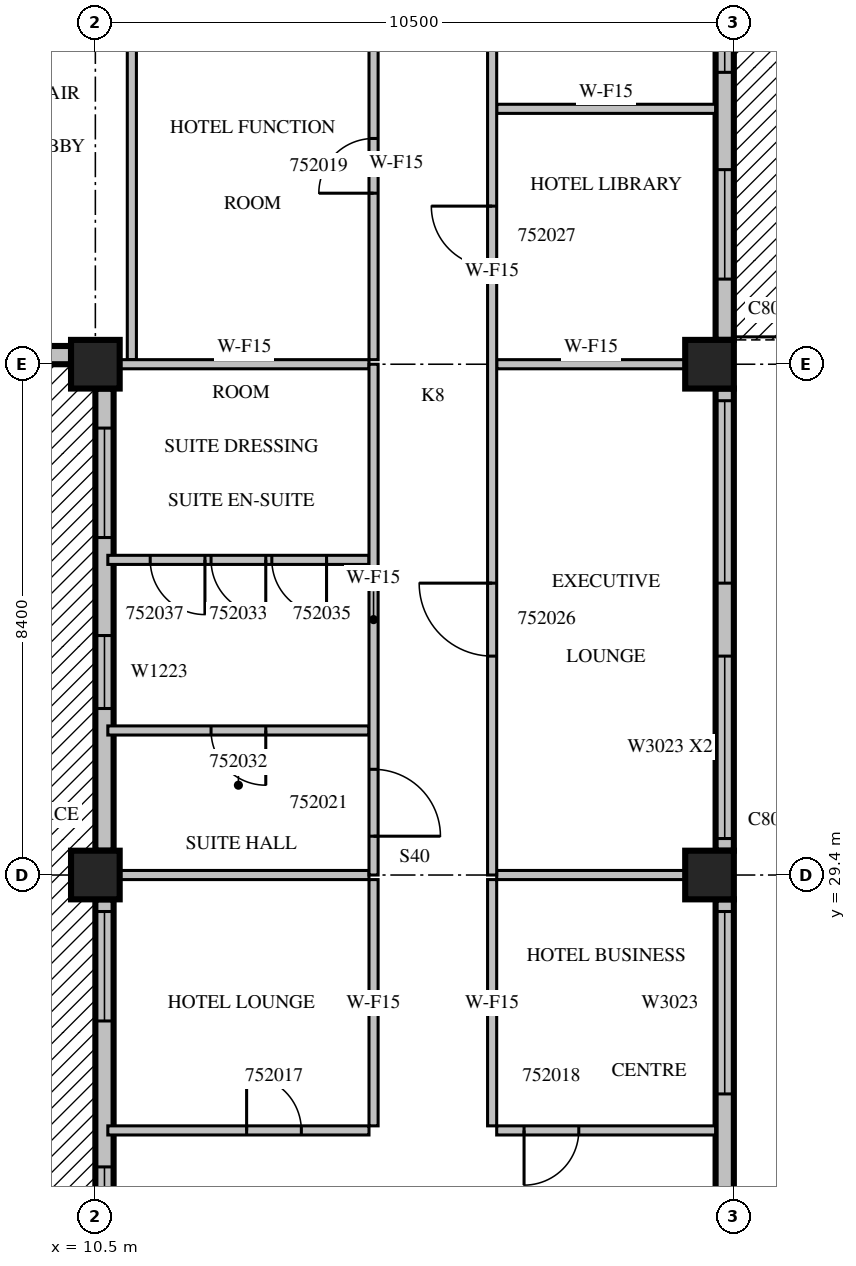
"""IFC4 building model, lengths in metres.
Left out: names, types, materials, properties, quantities, classifications, styles, units other than length and angle.
Written with IfcOpenShell. Run it as: python <this file> out.ifc"""

import sys

from ifc_helpers import new_model, si_unit, direction, frame, frame_2d, origin, origin_2d, place, context, subcontext, project, spatial, rectangle, extrude, source, transform, mapped, element, fill, save


model = new_model("IFC4")
c1 = context("Model", 3, precision=1e-05, world=origin(), true_north=direction((0.0, 1.0)))
c2 = subcontext(c1, "Body", "Model", "MODEL_VIEW")
j1 = project(units=[si_unit("LENGTHUNIT", "METRE"), si_unit("PLANEANGLEUNIT", "RADIAN")], contexts=[c1])
p1 = place(None, origin())
s1 = spatial("IfcSite", under=j1, at=p1, CompositionType="ELEMENT")
p2 = place(p1, origin())
s2 = spatial("IfcBuilding", under=s1, at=p2, CompositionType="ELEMENT")
p3 = place(p2, frame((0.0, 0.0, 231.0)))
s3 = spatial("IfcBuildingStorey", under=s2, at=p3, CompositionType="ELEMENT", Elevation=231.0)
m1 = source(origin(), c2, "Body", "SweptSolid", [
    extrude(rectangle(XDim=0.8, YDim=0.8, at=origin_2d()), origin(), (0.0, 0.0, 1.0), 3.8),
])
for number, where, z_axis, x_axis in (
    (1, (10.5, 29.4, 0.0), (0.0, 0.0, 1.0), (1.0, 0.0, 0.0)),
    (2, (20.6, 29.4, 0.0), (0.0, 0.0, 1.0), (1.0, 0.0, 0.0)),
    (3, (10.5, 37.8, 0.0), (0.0, 0.0, 1.0), (1.0, 0.0, 0.0)),
    (4, (20.6, 37.8, 0.0), (0.0, 0.0, 1.0), (1.0, 0.0, 0.0)),
):
    element("IfcColumn", number, at=place(p3, frame(where, z_axis=z_axis, x_axis=x_axis)), inside=s3, PredefinedType="COLUMN", context=c2, shape_type="MappedRepresentation", body=[
        mapped(m1, transform((0.0, 0.0, 0.0), scale=1.0)),
    ])
m2 = source(origin(), c2, "Body", "SweptSolid", [
    extrude(rectangle(XDim=7.2, YDim=0.3, at=frame_2d((3.6, 0.0))), origin(), (0.0, 0.0, 1.0), 3.4),
])
p4 = place(p3, frame((20.85, 21.8, 0.0), z_axis=(0.0, 0.0, 1.0), x_axis=(0.0, 1.0, 0.0)))
e5 = element("IfcWall", 5, at=p4, inside=s3, PredefinedType="STANDARD", context=c2, shape_type="MappedRepresentation", body=[
    mapped(m2, transform((0.0, 0.0, 0.0), scale=1.0)),
])
m3 = source(origin(), c2, "Body", "SweptSolid", [
    extrude(rectangle(XDim=1.8, YDim=2.3, at=frame_2d((0.9, 1.15))), frame((0.0, 0.16, 0.0), z_axis=(0.0, -1.0, 0.0), x_axis=(1.0, 0.0, 0.0)), (0.0, 0.0, 1.0), 0.32),
])
p5 = place(p4, frame((0.4, 0.0, 0.6)))
e6 = element("IfcOpeningElement", 6, at=p5, cuts=e5, PredefinedType="OPENING", context=c2, shape_type="MappedRepresentation", body=[
    mapped(m3, transform((0.0, 0.0, 0.0), scale=1.0)),
])
m4 = source(origin(), c2, "Body", "SweptSolid", [
    extrude(rectangle(XDim=3.0, YDim=2.3, at=frame_2d((1.5, 1.15))), frame((0.0, 0.16, 0.0), z_axis=(0.0, -1.0, 0.0), x_axis=(1.0, 0.0, 0.0)), (0.0, 0.0, 1.0), 0.32),
])
p6 = place(p4, frame((4.0, 0.0, 0.6)))
e7 = element("IfcOpeningElement", 7, at=p6, cuts=e5, PredefinedType="OPENING", context=c2, shape_type="MappedRepresentation", body=[
    mapped(m4, transform((0.0, 0.0, 0.0), scale=1.0)),
])
m5 = source(origin(), c2, "Body", "SweptSolid", [
    extrude(rectangle(XDim=7.6, YDim=0.3, at=frame_2d((3.8, 0.0))), origin(), (0.0, 0.0, 1.0), 3.4),
])
p7 = place(p3, frame((20.85, 29.8, 0.0), z_axis=(0.0, 0.0, 1.0), x_axis=(0.0, 1.0, 0.0)))
e8 = element("IfcWall", 8, at=p7, inside=s3, PredefinedType="STANDARD", context=c2, shape_type="MappedRepresentation", body=[
    mapped(m5, transform((0.0, 0.0, 0.0), scale=1.0)),
])
p8 = place(p7, frame((0.2, 0.0, 0.6)))
e9 = element("IfcOpeningElement", 9, at=p8, cuts=e8, PredefinedType="OPENING", context=c2, shape_type="MappedRepresentation", body=[
    mapped(m4, transform((0.0, 0.0, 0.0), scale=1.0)),
])
p9 = place(p7, frame((4.4, 0.0, 0.6)))
e10 = element("IfcOpeningElement", 10, at=p9, cuts=e8, PredefinedType="OPENING", context=c2, shape_type="MappedRepresentation", body=[
    mapped(m4, transform((0.0, 0.0, 0.0), scale=1.0)),
])
p10 = place(p3, frame((20.85, 38.2, 0.0), z_axis=(0.0, 0.0, 1.0), x_axis=(0.0, 1.0, 0.0)))
e11 = element("IfcWall", 11, at=p10, inside=s3, PredefinedType="STANDARD", context=c2, shape_type="MappedRepresentation", body=[
    mapped(m5, transform((0.0, 0.0, 0.0), scale=1.0)),
])
m6 = source(origin(), c2, "Body", "SweptSolid", [
    extrude(rectangle(XDim=1.8, YDim=2.4, at=frame_2d((0.9, 1.2))), frame((0.0, 0.16, 0.0), z_axis=(0.0, -1.0, 0.0), x_axis=(1.0, 0.0, 0.0)), (0.0, 0.0, 1.0), 0.32),
])
p11 = place(p10, frame((1.0, 0.0, 0.0)))
e12 = element("IfcOpeningElement", 12, at=p11, cuts=e11, PredefinedType="OPENING", context=c2, shape_type="MappedRepresentation", body=[
    mapped(m6, transform((0.0, 0.0, 0.0), scale=1.0)),
])
p12 = place(p10, frame((4.4, 0.0, 0.6)))
e13 = element("IfcOpeningElement", 13, at=p12, cuts=e11, PredefinedType="OPENING", context=c2, shape_type="MappedRepresentation", body=[
    mapped(m4, transform((0.0, 0.0, 0.0), scale=1.0)),
])
p13 = place(p3, frame((8.7, 37.95, 0.0), z_axis=(0.0, 0.0, 1.0), x_axis=(1.0, 0.0, 0.0)))
e14 = element("IfcWall", 14, at=p13, inside=s3, PredefinedType="STANDARD", context=c2, shape_type="SweptSolid", body=[
    extrude(rectangle(XDim=1.4, YDim=0.3, at=frame_2d((0.7, 0.0))), origin(), (0.0, 0.0, 1.0), 3.4),
])
p14 = place(p3, frame((10.65, 37.4, 0.0), z_axis=(0.0, 0.0, 1.0), x_axis=(0.0, -1.0, 0.0)))
e15 = element("IfcWall", 15, at=p14, inside=s3, PredefinedType="STANDARD", context=c2, shape_type="MappedRepresentation", body=[
    mapped(m5, transform((0.0, 0.0, 0.0), scale=1.0)),
])
p15 = place(p14, frame((0.65, 0.0, 0.0)))
e16 = element("IfcOpeningElement", 16, at=p15, cuts=e15, PredefinedType="OPENING", context=c2, shape_type="MappedRepresentation", body=[
    mapped(m6, transform((0.0, 0.0, 0.0), scale=1.0)),
])
m7 = source(origin(), c2, "Body", "SweptSolid", [
    extrude(rectangle(XDim=1.2, YDim=2.3, at=frame_2d((0.6, 1.15))), frame((0.0, 0.16, 0.0), z_axis=(0.0, -1.0, 0.0), x_axis=(1.0, 0.0, 0.0)), (0.0, 0.0, 1.0), 0.32),
])
p16 = place(p14, frame((4.061, 0.0, 0.6)))
e17 = element("IfcOpeningElement", 17, at=p16, cuts=e15, PredefinedType="OPENING", context=c2, shape_type="MappedRepresentation", body=[
    mapped(m7, transform((0.0, 0.0, 0.0), scale=1.0)),
])
p17 = place(p3, frame((10.65, 29.0, 0.0), z_axis=(0.0, 0.0, 1.0), x_axis=(0.0, -1.0, 0.0)))
e18 = element("IfcWall", 18, at=p17, inside=s3, PredefinedType="STANDARD", context=c2, shape_type="MappedRepresentation", body=[
    mapped(m2, transform((0.0, 0.0, 0.0), scale=1.0)),
])
p18 = place(p17, frame((0.2, 0.0, 0.0)))
e19 = element("IfcOpeningElement", 19, at=p18, cuts=e18, PredefinedType="OPENING", context=c2, shape_type="MappedRepresentation", body=[
    mapped(m6, transform((0.0, 0.0, 0.0), scale=1.0)),
])
p19 = place(p17, frame((4.4, 0.0, 0.0)))
e20 = element("IfcOpeningElement", 20, at=p19, cuts=e18, PredefinedType="OPENING", context=c2, shape_type="MappedRepresentation", body=[
    mapped(m6, transform((0.0, 0.0, 0.0), scale=1.0)),
])
m8 = source(origin(), c2, "Body", "SweptSolid", [
    extrude(rectangle(XDim=4.295, YDim=0.15, at=frame_2d((2.147, 0.0))), origin(), (0.0, 0.0, 1.0), 3.4),
])
p20 = place(p3, frame((10.705, 25.2, 0.0), z_axis=(0.0, 0.0, 1.0), x_axis=(1.0, 0.0, 0.0)))
e21 = element("IfcWall", 21, at=p20, inside=s3, PredefinedType="PARTITIONING", context=c2, shape_type="MappedRepresentation", body=[
    mapped(m8, transform((0.0, 0.0, 0.0), scale=1.0)),
])
m9 = source(origin(), c2, "Body", "SweptSolid", [
    extrude(rectangle(XDim=0.9, YDim=2.1, at=frame_2d((0.45, 1.05))), frame((0.0, 0.085, 0.0), z_axis=(0.0, -1.0, 0.0), x_axis=(1.0, 0.0, 0.0)), (0.0, 0.0, 1.0), 0.17),
])
p21 = place(p20, frame((2.283, 0.0, 0.0)))
e22 = element("IfcOpeningElement", 22, at=p21, cuts=e21, PredefinedType="OPENING", context=c2, shape_type="MappedRepresentation", body=[
    mapped(m9, transform((0.0, 0.0, 0.0), scale=1.0)),
])
m10 = source(origin(), c2, "Body", "SweptSolid", [
    extrude(rectangle(XDim=3.6, YDim=0.15, at=frame_2d((1.8, 0.0))), origin(), (0.0, 0.0, 1.0), 3.4),
])
p22 = place(p3, frame((17.1, 25.2, 0.0), z_axis=(0.0, 0.0, 1.0), x_axis=(1.0, 0.0, 0.0)))
e23 = element("IfcWall", 23, at=p22, inside=s3, PredefinedType="PARTITIONING", context=c2, shape_type="MappedRepresentation", body=[
    mapped(m10, transform((0.0, 0.0, 0.0), scale=1.0)),
])
p23 = place(p22, frame((0.45, 0.0, 0.0)))
e24 = element("IfcOpeningElement", 24, at=p23, cuts=e23, PredefinedType="OPENING", context=c2, shape_type="MappedRepresentation", body=[
    mapped(m9, transform((0.0, 0.0, 0.0), scale=1.0)),
])
m11 = source(origin(), c2, "Body", "SweptSolid", [
    extrude(rectangle(XDim=4.05, YDim=0.15, at=frame_2d((2.025, 0.0))), origin(), (0.0, 0.0, 1.0), 3.4),
])
for number, where, z_axis, x_axis in (
    (25, (15.075, 25.275, 0.0), (0.0, 0.0, 1.0), (0.0, 1.0, 0.0)),
    (26, (17.025, 29.325, 0.0), (0.0, 0.0, 1.0), (0.0, -1.0, 0.0)),
):
    element("IfcWall", number, at=place(p3, frame(where, z_axis=z_axis, x_axis=x_axis)), inside=s3, PredefinedType="PARTITIONING", context=c2, shape_type="MappedRepresentation", body=[
        mapped(m11, transform((0.0, 0.0, 0.0), scale=1.0)),
    ])
m12 = source(origin(), c2, "Body", "SweptSolid", [
    extrude(rectangle(XDim=4.101, YDim=0.15, at=frame_2d((2.05, 0.0))), origin(), (0.0, 0.0, 1.0), 3.4),
])
p24 = place(p3, frame((15.0, 29.4, 0.0), z_axis=(0.0, 0.0, 1.0), x_axis=(-1.0, 0.0, 0.0)))
e27 = element("IfcWall", 27, at=p24, inside=s3, PredefinedType="PARTITIONING", context=c2, shape_type="MappedRepresentation", body=[
    mapped(m12, transform((0.0, 0.0, 0.0), scale=1.0)),
])
m13 = source(origin(), c2, "Body", "SweptSolid", [
    extrude(rectangle(XDim=3.101, YDim=0.15, at=frame_2d((1.55, 0.0))), origin(), (0.0, 0.0, 1.0), 3.4),
])
p25 = place(p3, frame((20.201, 29.4, 0.0), z_axis=(0.0, 0.0, 1.0), x_axis=(-1.0, 0.0, 0.0)))
e28 = element("IfcWall", 28, at=p25, inside=s3, PredefinedType="PARTITIONING", context=c2, shape_type="MappedRepresentation", body=[
    mapped(m13, transform((0.0, 0.0, 0.0), scale=1.0)),
])
m14 = source(origin(), c2, "Body", "SweptSolid", [
    extrude(rectangle(XDim=6.45, YDim=0.15, at=frame_2d((3.225, 0.0))), origin(), (0.0, 0.0, 1.0), 3.4),
])
p26 = place(p3, frame((11.1, 44.325, 0.0), z_axis=(0.0, 0.0, 1.0), x_axis=(0.0, -1.0, 0.0)))
e29 = element("IfcWall", 29, at=p26, inside=s3, PredefinedType="PARTITIONING", context=c2, shape_type="MappedRepresentation", body=[
    mapped(m14, transform((0.0, 0.0, 0.0), scale=1.0)),
])
p27 = place(p3, frame((15.075, 37.875, 0.0), z_axis=(0.0, 0.0, 1.0), x_axis=(0.0, 1.0, 0.0)))
e30 = element("IfcWall", 30, at=p27, inside=s3, PredefinedType="PARTITIONING", context=c2, shape_type="MappedRepresentation", body=[
    mapped(m14, transform((0.0, 0.0, 0.0), scale=1.0)),
])
p28 = place(p27, frame((2.737, 0.0, 0.0)))
e31 = element("IfcOpeningElement", 31, at=p28, cuts=e30, PredefinedType="OPENING", context=c2, shape_type="MappedRepresentation", body=[
    mapped(m9, transform((0.0, 0.0, 0.0), scale=1.0)),
])
p29 = place(p3, frame((15.0, 31.777, 0.0), z_axis=(0.0, 0.0, 1.0), x_axis=(-1.0, 0.0, 0.0)))
e32 = element("IfcWall", 32, at=p29, inside=s3, PredefinedType="PARTITIONING", context=c2, shape_type="MappedRepresentation", body=[
    mapped(m8, transform((0.0, 0.0, 0.0), scale=1.0)),
])
p30 = place(p29, frame((1.698, 0.0, 0.0)))
e33 = element("IfcOpeningElement", 33, at=p30, cuts=e32, PredefinedType="OPENING", context=c2, shape_type="MappedRepresentation", body=[
    mapped(m9, transform((0.0, 0.0, 0.0), scale=1.0)),
])
p31 = place(p3, frame((15.0, 34.583, 0.0), z_axis=(0.0, 0.0, 1.0), x_axis=(-1.0, 0.0, 0.0)))
e34 = element("IfcWall", 34, at=p31, inside=s3, PredefinedType="PARTITIONING", context=c2, shape_type="MappedRepresentation", body=[
    mapped(m8, transform((0.0, 0.0, 0.0), scale=1.0)),
])
p32 = place(p31, frame((1.698, 0.0, 0.0)))
e35 = element("IfcOpeningElement", 35, at=p32, cuts=e34, PredefinedType="OPENING", context=c2, shape_type="MappedRepresentation", body=[
    mapped(m9, transform((0.0, 0.0, 0.0), scale=1.0)),
])
p33 = place(p31, frame((0.698, 0.0, 0.0)))
e36 = element("IfcOpeningElement", 36, at=p33, cuts=e34, PredefinedType="OPENING", context=c2, shape_type="MappedRepresentation", body=[
    mapped(m9, transform((0.0, 0.0, 0.0), scale=1.0)),
])
p34 = place(p31, frame((2.698, 0.0, 0.0)))
e37 = element("IfcOpeningElement", 37, at=p34, cuts=e34, PredefinedType="OPENING", context=c2, shape_type="MappedRepresentation", body=[
    mapped(m9, transform((0.0, 0.0, 0.0), scale=1.0)),
])
p35 = place(p3, frame((15.0, 37.8, 0.0), z_axis=(0.0, 0.0, 1.0), x_axis=(-1.0, 0.0, 0.0)))
e38 = element("IfcWall", 38, at=p35, inside=s3, PredefinedType="PARTITIONING", context=c2, shape_type="MappedRepresentation", body=[
    mapped(m12, transform((0.0, 0.0, 0.0), scale=1.0)),
])
p36 = place(p3, frame((20.201, 37.8, 0.0), z_axis=(0.0, 0.0, 1.0), x_axis=(-1.0, 0.0, 0.0)))
e39 = element("IfcWall", 39, at=p36, inside=s3, PredefinedType="PARTITIONING", context=c2, shape_type="MappedRepresentation", body=[
    mapped(m13, transform((0.0, 0.0, 0.0), scale=1.0)),
])
p37 = place(p3, frame((20.7, 42.0, 0.0), z_axis=(0.0, 0.0, 1.0), x_axis=(-1.0, 0.0, 0.0)))
e40 = element("IfcWall", 40, at=p37, inside=s3, PredefinedType="PARTITIONING", context=c2, shape_type="MappedRepresentation", body=[
    mapped(m10, transform((0.0, 0.0, 0.0), scale=1.0)),
])
m15 = source(origin(), c2, "Body", "SweptSolid", [
    extrude(rectangle(XDim=8.4, YDim=0.15, at=frame_2d((4.2, 0.0))), origin(), (0.0, 0.0, 1.0), 3.4),
])
p38 = place(p3, frame((15.075, 29.4, 0.0), z_axis=(0.0, 0.0, 1.0), x_axis=(0.0, 1.0, 0.0)))
e41 = element("IfcWall", 41, at=p38, inside=s3, PredefinedType="PARTITIONING", context=c2, shape_type="MappedRepresentation", body=[
    mapped(m15, transform((0.0, 0.0, 0.0), scale=1.0)),
])
m16 = source(origin(), c2, "Body", "SweptSolid", [
    extrude(rectangle(XDim=1.1, YDim=2.1, at=frame_2d((0.55, 1.05))), frame((0.0, 0.085, 0.0), z_axis=(0.0, -1.0, 0.0), x_axis=(1.0, 0.0, 0.0)), (0.0, 0.0, 1.0), 0.17),
])
p39 = place(p38, frame((0.638, 0.0, 0.0)))
e42 = element("IfcOpeningElement", 42, at=p39, cuts=e41, PredefinedType="OPENING", context=c2, shape_type="MappedRepresentation", body=[
    mapped(m16, transform((0.0, 0.0, 0.0), scale=1.0)),
])
m17 = source(origin(), c2, "Body", "SweptSolid", [
    extrude(rectangle(XDim=19.86, YDim=0.15, at=frame_2d((9.93, 0.0))), origin(), (0.0, 0.0, 1.0), 3.4),
])
p40 = place(p3, frame((17.025, 49.26, 0.0), z_axis=(0.0, 0.0, 1.0), x_axis=(0.0, -1.0, 0.0)))
e43 = element("IfcWall", 43, at=p40, inside=s3, PredefinedType="PARTITIONING", context=c2, shape_type="MappedRepresentation", body=[
    mapped(m17, transform((0.0, 0.0, 0.0), scale=1.0)),
])
m18 = source(origin(), c2, "Body", "SweptSolid", [
    extrude(rectangle(XDim=1.2, YDim=2.1, at=frame_2d((0.6, 1.05))), frame((0.0, 0.085, 0.0), z_axis=(0.0, -1.0, 0.0), x_axis=(1.0, 0.0, 0.0)), (0.0, 0.0, 1.0), 0.17),
])
p41 = place(p40, frame((15.06, 0.0, 0.0)))
e44 = element("IfcOpeningElement", 44, at=p41, cuts=e43, PredefinedType="OPENING", context=c2, shape_type="MappedRepresentation", body=[
    mapped(m18, transform((0.0, 0.0, 0.0), scale=1.0)),
])
m19 = source(origin(), c2, "Body", "SweptSolid", [
    extrude(rectangle(XDim=1.0, YDim=2.1, at=frame_2d((0.5, 1.05))), frame((0.0, 0.085, 0.0), z_axis=(0.0, -1.0, 0.0), x_axis=(1.0, 0.0, 0.0)), (0.0, 0.0, 1.0), 0.17),
])
p42 = place(p40, frame((8.86, 0.0, 0.0)))
e45 = element("IfcOpeningElement", 45, at=p42, cuts=e43, PredefinedType="OPENING", context=c2, shape_type="MappedRepresentation", body=[
    mapped(m19, transform((0.0, 0.0, 0.0), scale=1.0)),
])
p43 = place(p40, frame((3.092, 0.0, 0.0)))
e46 = element("IfcOpeningElement", 46, at=p43, cuts=e43, PredefinedType="OPENING", context=c2, shape_type="MappedRepresentation", body=[
    mapped(m19, transform((0.0, 0.0, 0.0), scale=1.0)),
])
m20 = source(origin(), c2, "Body", "SweptSolid", [
    extrude(rectangle(XDim=3.0, YDim=2.3, at=frame_2d((1.5, 1.15))), frame((0.0, 0.03, 0.0), z_axis=(0.0, -1.0, 0.0), x_axis=(1.0, 0.0, 0.0)), (0.0, 0.0, 1.0), 0.06),
])
p44 = place(p6, origin())
e47 = element("IfcWindow", 47, at=p44, inside=s3, PartitioningType="SINGLE_PANEL", PredefinedType="WINDOW", context=c2, shape_type="MappedRepresentation", body=[
    mapped(m20, transform((0.0, 0.0, 0.0), scale=1.0)),
])
fill(e7, e47)
p45 = place(p8, origin())
e48 = element("IfcWindow", 48, at=p45, inside=s3, PartitioningType="SINGLE_PANEL", PredefinedType="WINDOW", context=c2, shape_type="MappedRepresentation", body=[
    mapped(m20, transform((0.0, 0.0, 0.0), scale=1.0)),
])
fill(e9, e48)
p46 = place(p9, origin())
e49 = element("IfcWindow", 49, at=p46, inside=s3, PartitioningType="SINGLE_PANEL", PredefinedType="WINDOW", context=c2, shape_type="MappedRepresentation", body=[
    mapped(m20, transform((0.0, 0.0, 0.0), scale=1.0)),
])
fill(e10, e49)
m21 = source(origin(), c2, "Body", "SweptSolid", [
    extrude(rectangle(XDim=1.8, YDim=2.4, at=frame_2d((0.9, 1.2))), frame((0.0, 0.025, 0.0), z_axis=(0.0, -1.0, 0.0), x_axis=(1.0, 0.0, 0.0)), (0.0, 0.0, 1.0), 0.05),
])
p47 = place(p11, origin())
e50 = element("IfcDoor", 50, at=p47, inside=s3, OperationType="SLIDING_TO_LEFT", PredefinedType="DOOR", context=c2, shape_type="MappedRepresentation", body=[
    mapped(m21, transform((0.0, 0.0, 0.0), scale=1.0)),
])
fill(e12, e50)
p48 = place(p12, origin())
e51 = element("IfcWindow", 51, at=p48, inside=s3, PartitioningType="SINGLE_PANEL", PredefinedType="WINDOW", context=c2, shape_type="MappedRepresentation", body=[
    mapped(m20, transform((0.0, 0.0, 0.0), scale=1.0)),
])
fill(e13, e51)
p49 = place(p15, origin())
e52 = element("IfcDoor", 52, at=p49, inside=s3, OperationType="SLIDING_TO_LEFT", PredefinedType="DOOR", context=c2, shape_type="MappedRepresentation", body=[
    mapped(m21, transform((0.0, 0.0, 0.0), scale=1.0)),
])
fill(e16, e52)
p50 = place(p18, origin())
e53 = element("IfcDoor", 53, at=p50, inside=s3, OperationType="SLIDING_TO_LEFT", PredefinedType="DOOR", context=c2, shape_type="MappedRepresentation", body=[
    mapped(m21, transform((0.0, 0.0, 0.0), scale=1.0)),
])
fill(e19, e53)
p51 = place(p19, origin())
e54 = element("IfcDoor", 54, at=p51, inside=s3, OperationType="SLIDING_TO_LEFT", PredefinedType="DOOR", context=c2, shape_type="MappedRepresentation", body=[
    mapped(m21, transform((0.0, 0.0, 0.0), scale=1.0)),
])
fill(e20, e54)
m22 = source(origin(), c2, "Body", "SweptSolid", [
    extrude(rectangle(XDim=1.2, YDim=2.3, at=frame_2d((0.6, 1.15))), frame((0.0, 0.03, 0.0), z_axis=(0.0, -1.0, 0.0), x_axis=(1.0, 0.0, 0.0)), (0.0, 0.0, 1.0), 0.06),
])
p52 = place(p16, origin())
e55 = element("IfcWindow", 55, at=p52, inside=s3, PartitioningType="SINGLE_PANEL", PredefinedType="WINDOW", context=c2, shape_type="MappedRepresentation", body=[
    mapped(m22, transform((0.0, 0.0, 0.0), scale=1.0)),
])
fill(e17, e55)
m23 = source(origin(), c2, "Body", "SweptSolid", [
    extrude(rectangle(XDim=0.9, YDim=2.1, at=frame_2d((0.45, 1.05))), frame((0.0, 0.025, 0.0), z_axis=(0.0, -1.0, 0.0), x_axis=(1.0, 0.0, 0.0)), (0.0, 0.0, 1.0), 0.05),
])
p53 = place(p21, origin())
e56 = element("IfcDoor", 56, at=p53, inside=s3, OperationType="SINGLE_SWING_LEFT", PredefinedType="DOOR", context=c2, shape_type="MappedRepresentation", body=[
    mapped(m23, transform((0.0, 0.0, 0.0), scale=1.0)),
])
fill(e22, e56)
p54 = place(p23, origin())
e57 = element("IfcDoor", 57, at=p54, inside=s3, OperationType="SINGLE_SWING_RIGHT", PredefinedType="DOOR", context=c2, shape_type="MappedRepresentation", body=[
    mapped(m23, transform((0.0, 0.0, 0.0), scale=1.0)),
])
fill(e24, e57)
p55 = place(p28, origin())
e58 = element("IfcDoor", 58, at=p55, inside=s3, OperationType="SINGLE_SWING_LEFT", PredefinedType="DOOR", context=c2, shape_type="MappedRepresentation", body=[
    mapped(m23, transform((0.0, 0.0, 0.0), scale=1.0)),
])
fill(e31, e58)
m24 = source(origin(), c2, "Body", "SweptSolid", [
    extrude(rectangle(XDim=1.1, YDim=2.1, at=frame_2d((0.55, 1.05))), frame((0.0, 0.025, 0.0), z_axis=(0.0, -1.0, 0.0), x_axis=(1.0, 0.0, 0.0)), (0.0, 0.0, 1.0), 0.05),
])
p56 = place(p39, origin())
e59 = element("IfcDoor", 59, at=p56, inside=s3, OperationType="SINGLE_SWING_RIGHT", PredefinedType="DOOR", context=c2, shape_type="MappedRepresentation", body=[
    mapped(m24, transform((0.0, 0.0, 0.0), scale=1.0)),
])
fill(e42, e59)
m25 = source(origin(), c2, "Body", "SweptSolid", [
    extrude(rectangle(XDim=1.2, YDim=2.1, at=frame_2d((0.6, 1.05))), frame((0.0, 0.025, 0.0), z_axis=(0.0, -1.0, 0.0), x_axis=(1.0, 0.0, 0.0)), (0.0, 0.0, 1.0), 0.05),
])
p57 = place(p41, origin())
e60 = element("IfcDoor", 60, at=p57, inside=s3, OperationType="SINGLE_SWING_RIGHT", PredefinedType="DOOR", context=c2, shape_type="MappedRepresentation", body=[
    mapped(m25, transform((0.0, 0.0, 0.0), scale=1.0)),
])
fill(e44, e60)
m26 = source(origin(), c2, "Body", "SweptSolid", [
    extrude(rectangle(XDim=1.0, YDim=2.1, at=frame_2d((0.5, 1.05))), frame((0.0, 0.025, 0.0), z_axis=(0.0, -1.0, 0.0), x_axis=(1.0, 0.0, 0.0)), (0.0, 0.0, 1.0), 0.05),
])
p58 = place(p42, origin())
e61 = element("IfcDoor", 61, at=p58, inside=s3, OperationType="SINGLE_SWING_RIGHT", PredefinedType="DOOR", context=c2, shape_type="MappedRepresentation", body=[
    mapped(m26, transform((0.0, 0.0, 0.0), scale=1.0)),
])
fill(e45, e61)
p59 = place(p30, origin())
e62 = element("IfcDoor", 62, at=p59, inside=s3, OperationType="SINGLE_SWING_LEFT", PredefinedType="DOOR", context=c2, shape_type="MappedRepresentation", body=[
    mapped(m23, transform((0.0, 0.0, 0.0), scale=1.0)),
])
fill(e33, e62)
p60 = place(p32, origin())
e63 = element("IfcDoor", 63, at=p60, inside=s3, OperationType="SINGLE_SWING_LEFT", PredefinedType="DOOR", context=c2, shape_type="MappedRepresentation", body=[
    mapped(m23, transform((0.0, 0.0, 0.0), scale=1.0)),
])
fill(e35, e63)
p61 = place(p33, origin())
e64 = element("IfcDoor", 64, at=p61, inside=s3, OperationType="SINGLE_SWING_LEFT", PredefinedType="DOOR", context=c2, shape_type="MappedRepresentation", body=[
    mapped(m23, transform((0.0, 0.0, 0.0), scale=1.0)),
])
fill(e36, e64)
p62 = place(p34, origin())
e65 = element("IfcDoor", 65, at=p62, inside=s3, OperationType="SINGLE_SWING_LEFT", PredefinedType="DOOR", context=c2, shape_type="MappedRepresentation", body=[
    mapped(m23, transform((0.0, 0.0, 0.0), scale=1.0)),
])
fill(e37, e65)
save(model, sys.argv[1])
